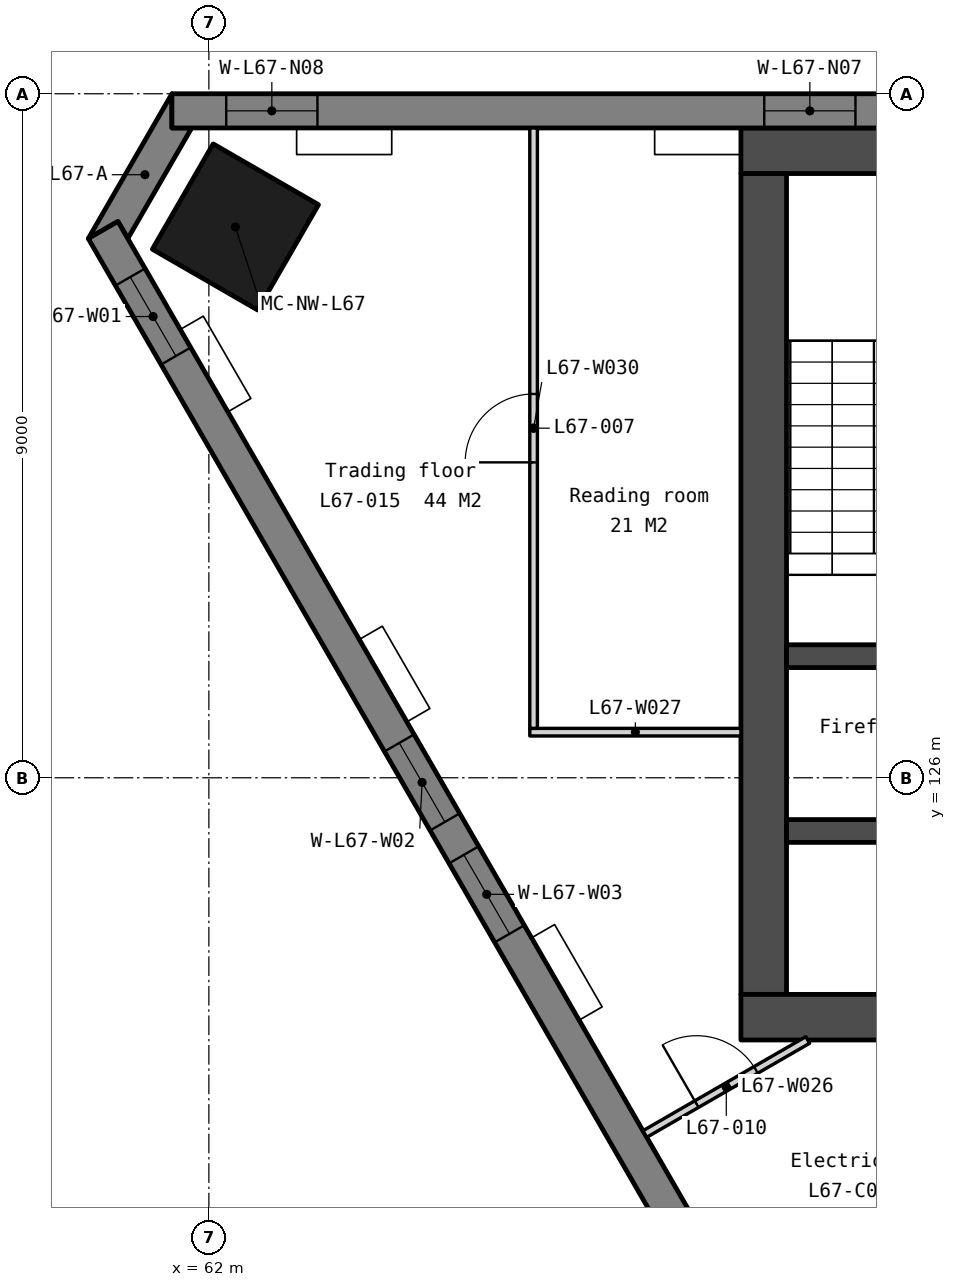
"""IFC4 building model, lengths in metres.
Left out: names, types, materials, properties, quantities, classifications, styles, units other than length and angle.
Written with IfcOpenShell. Run it as: python <this file> out.ifc"""

import sys

from ifc_helpers import new_model, si_unit, direction, frame, frame_2d, origin, origin_2d, place, context, subcontext, project, spatial, polyline, rectangle, outline, extrude, element, fill, save


model = new_model("IFC4")
c1 = context("Model", 3, precision=1e-05, world=origin(), true_north=direction((0.0, 1.0)))
c2 = subcontext(c1, "Body", "Model", "MODEL_VIEW")
j1 = project(units=[si_unit("LENGTHUNIT", "METRE"), si_unit("PLANEANGLEUNIT", "RADIAN")], contexts=[c1])
p1 = place(None, origin())
s1 = spatial("IfcSite", under=j1, at=p1, CompositionType="ELEMENT")
p2 = place(p1, origin())
s2 = spatial("IfcBuilding", under=s1, at=p2, CompositionType="ELEMENT")
p3 = place(p2, frame((0.0, 0.0, 273.8)))
s3 = spatial("IfcBuildingStorey", under=s2, at=p3, CompositionType="ELEMENT", Elevation=273.8)
p4 = place(p3, frame((62.349, 133.247, 0.0), z_axis=(0.0, 0.0, 1.0), x_axis=(-0.5, -0.866025403784, 0.0)))
e1 = element("IfcColumn", 1, at=p4, inside=s3, PredefinedType="COLUMN", context=c2, shape_type="SweptSolid", body=[
    extrude(rectangle(XDim=1.6, YDim=1.6, at=origin_2d()), origin(), (0.0, 0.0, 1.0), 3.9),
])
p5 = place(p3, frame((69.0, 134.25, 0.0), z_axis=(0.0, 0.0, 1.0), x_axis=(1.0, 0.0, 0.0)))
e2 = element("IfcWall", 2, at=p5, inside=s3, PredefinedType="SOLIDWALL", context=c2, shape_type="SweptSolid", body=[
    extrude(rectangle(XDim=22.0, YDim=0.6, at=frame_2d((11.0, 0.0))), origin(), (0.0, 0.0, 1.0), 3.75),
])
p6 = place(p3, frame((69.3, 133.95, 0.0), z_axis=(0.0, 0.0, 1.0), x_axis=(0.0, -1.0, 0.0)))
e3 = element("IfcWall", 3, at=p6, inside=s3, PredefinedType="SOLIDWALL", context=c2, shape_type="SweptSolid", body=[
    extrude(rectangle(XDim=10.8, YDim=0.6, at=frame_2d((5.4, 0.0))), origin(), (0.0, 0.0, 1.0), 3.75),
])
p7 = place(p3, frame((69.0, 122.85, 0.0), z_axis=(0.0, 0.0, 1.0), x_axis=(1.0, 0.0, 0.0)))
e4 = element("IfcWall", 4, at=p7, inside=s3, PredefinedType="SOLIDWALL", context=c2, shape_type="SweptSolid", body=[
    extrude(rectangle(XDim=22.0, YDim=0.6, at=frame_2d((11.0, 0.0))), origin(), (0.0, 0.0, 1.0), 3.75),
])
p8 = place(p7, frame((16.375, 0.0, 0.0)))
e5 = element("IfcOpeningElement", 5, at=p8, cuts=e4, PredefinedType="OPENING", context=c2, shape_type="SweptSolid", body=[
    extrude(rectangle(XDim=1.8, YDim=2.1, at=frame_2d((0.9, 1.05))), frame((0.0, 0.31, 0.0), z_axis=(0.0, -1.0, 0.0), x_axis=(1.0, 0.0, 0.0)), (0.0, 0.0, 1.0), 0.62),
])
p9 = place(p7, frame((3.825, 0.0, 0.0)))
e6 = element("IfcOpeningElement", 6, at=p9, cuts=e4, PredefinedType="OPENING", context=c2, shape_type="SweptSolid", body=[
    extrude(rectangle(XDim=1.8, YDim=2.1, at=frame_2d((0.9, 1.05))), frame((0.0, 0.31, 0.0), z_axis=(0.0, -1.0, 0.0), x_axis=(1.0, 0.0, 0.0)), (0.0, 0.0, 1.0), 0.62),
])
p10 = place(p7, frame((12.85, 0.0, 0.0)))
e7 = element("IfcOpeningElement", 7, at=p10, cuts=e4, PredefinedType="OPENING", context=c2, shape_type="SweptSolid", body=[
    extrude(rectangle(XDim=1.5, YDim=2.1, at=frame_2d((0.75, 1.05))), frame((0.0, 0.31, 0.0), z_axis=(0.0, -1.0, 0.0), x_axis=(1.0, 0.0, 0.0)), (0.0, 0.0, 1.0), 0.62),
])
for number, where, z_axis, x_axis in (
    (8, (69.6, 127.6, 0.0), (0.0, 0.0, 1.0), (1.0, 0.0, 0.0)),
    (9, (69.6, 125.3, 0.0), (0.0, 0.0, 1.0), (1.0, 0.0, 0.0)),
):
    element("IfcWall", number, at=place(p3, frame(where, z_axis=z_axis, x_axis=x_axis)), inside=s3, PredefinedType="SOLIDWALL", context=c2, shape_type="SweptSolid", body=[
        extrude(rectangle(XDim=2.55, YDim=0.3, at=frame_2d((1.275, 0.0))), origin(), (0.0, 0.0, 1.0), 3.75),
    ])
p11 = place(p3, frame((0.0, 0.0, -0.15)))
e10 = element("IfcWall", 10, at=p11, inside=s3, PredefinedType="SOLIDWALL", context=c2, shape_type="SweptSolid", body=[
    extrude(outline(polyline([(61.514, 135.0), (61.514, 134.55), (61.774, 134.55), (60.933, 133.095), (60.803, 133.32), (60.414, 133.095), (61.514, 135.0)])), origin(), (0.0, 0.0, 1.0), 3.9),
])
p12 = place(p3, frame((98.486, 134.775, -0.15), z_axis=(0.0, 0.0, 1.0), x_axis=(-1.0, 0.0, 0.0)))
e11 = element("IfcWall", 11, at=p12, inside=s3, PredefinedType="SOLIDWALL", context=c2, shape_type="SweptSolid", body=[
    extrude(outline(polyline([(36.972, 0.0), (36.972, 3.9), (0.0, 3.9), (0.0, 0.0), (36.972, 0.0)])), frame((0.0, 0.225, 0.0), z_axis=(0.0, -1.0, 0.0), x_axis=(1.0, 0.0, 0.0)), (0.0, 0.0, 1.0), 0.45),
])
p13 = place(p12, frame((0.715, 0.0, 0.95)))
e12 = element("IfcOpeningElement", 12, at=p13, cuts=e11, PredefinedType="OPENING", context=c2, shape_type="SweptSolid", body=[
    extrude(rectangle(XDim=1.2, YDim=2.2, at=frame_2d((0.6, 1.1))), frame((0.0, 0.235, 0.0), z_axis=(0.0, -1.0, 0.0), x_axis=(1.0, 0.0, 0.0)), (0.0, 0.0, 1.0), 0.47),
])
p14 = place(p12, frame((7.793, 0.0, 0.95)))
e13 = element("IfcOpeningElement", 13, at=p14, cuts=e11, PredefinedType="OPENING", context=c2, shape_type="SweptSolid", body=[
    extrude(rectangle(XDim=1.2, YDim=2.2, at=frame_2d((0.6, 1.1))), frame((0.0, 0.235, 0.0), z_axis=(0.0, -1.0, 0.0), x_axis=(1.0, 0.0, 0.0)), (0.0, 0.0, 1.0), 0.47),
])
p15 = place(p12, frame((9.493, 0.0, 0.95)))
e14 = element("IfcOpeningElement", 14, at=p15, cuts=e11, PredefinedType="OPENING", context=c2, shape_type="SweptSolid", body=[
    extrude(rectangle(XDim=1.2, YDim=2.2, at=frame_2d((0.6, 1.1))), frame((0.0, 0.235, 0.0), z_axis=(0.0, -1.0, 0.0), x_axis=(1.0, 0.0, 0.0)), (0.0, 0.0, 1.0), 0.47),
])
p16 = place(p12, frame((17.036, 0.0, 0.95)))
e15 = element("IfcOpeningElement", 15, at=p16, cuts=e11, PredefinedType="OPENING", context=c2, shape_type="SweptSolid", body=[
    extrude(rectangle(XDim=1.2, YDim=2.2, at=frame_2d((0.6, 1.1))), frame((0.0, 0.235, 0.0), z_axis=(0.0, -1.0, 0.0), x_axis=(1.0, 0.0, 0.0)), (0.0, 0.0, 1.0), 0.47),
])
p17 = place(p12, frame((18.736, 0.0, 0.95)))
e16 = element("IfcOpeningElement", 16, at=p17, cuts=e11, PredefinedType="OPENING", context=c2, shape_type="SweptSolid", body=[
    extrude(rectangle(XDim=1.2, YDim=2.2, at=frame_2d((0.6, 1.1))), frame((0.0, 0.235, 0.0), z_axis=(0.0, -1.0, 0.0), x_axis=(1.0, 0.0, 0.0)), (0.0, 0.0, 1.0), 0.47),
])
p18 = place(p12, frame((26.279, 0.0, 0.95)))
e17 = element("IfcOpeningElement", 17, at=p18, cuts=e11, PredefinedType="OPENING", context=c2, shape_type="SweptSolid", body=[
    extrude(rectangle(XDim=1.2, YDim=2.2, at=frame_2d((0.6, 1.1))), frame((0.0, 0.235, 0.0), z_axis=(0.0, -1.0, 0.0), x_axis=(1.0, 0.0, 0.0)), (0.0, 0.0, 1.0), 0.47),
])
p19 = place(p12, frame((27.979, 0.0, 0.95)))
e18 = element("IfcOpeningElement", 18, at=p19, cuts=e11, PredefinedType="OPENING", context=c2, shape_type="SweptSolid", body=[
    extrude(rectangle(XDim=1.2, YDim=2.2, at=frame_2d((0.6, 1.1))), frame((0.0, 0.235, 0.0), z_axis=(0.0, -1.0, 0.0), x_axis=(1.0, 0.0, 0.0)), (0.0, 0.0, 1.0), 0.47),
])
p20 = place(p12, frame((35.058, 0.0, 0.95)))
e19 = element("IfcOpeningElement", 19, at=p20, cuts=e11, PredefinedType="OPENING", context=c2, shape_type="SweptSolid", body=[
    extrude(rectangle(XDim=1.2, YDim=2.2, at=frame_2d((0.6, 1.1))), frame((0.0, 0.235, 0.0), z_axis=(0.0, -1.0, 0.0), x_axis=(1.0, 0.0, 0.0)), (0.0, 0.0, 1.0), 0.47),
])
p21 = place(p3, frame((60.609, 133.207, -0.15), z_axis=(0.0, 0.0, 1.0), x_axis=(0.500002536638, -0.866023939251, 0.0)))
e20 = element("IfcWall", 20, at=p21, inside=s3, PredefinedType="SOLIDWALL", context=c2, shape_type="SweptSolid", body=[
    extrude(outline(polyline([(36.972, 0.0), (36.972, 3.9), (0.0, 3.9), (0.0, 0.0), (36.972, 0.0)])), frame((0.0, 0.225, 0.0), z_axis=(0.0, -1.0, 0.0), x_axis=(1.0, 0.0, 0.0)), (0.0, 0.0, 1.0), 0.45),
])
p22 = place(p21, frame((0.715, 0.0, 0.95)))
e21 = element("IfcOpeningElement", 21, at=p22, cuts=e20, PredefinedType="OPENING", context=c2, shape_type="SweptSolid", body=[
    extrude(rectangle(XDim=1.2, YDim=2.2, at=frame_2d((0.6, 1.1))), frame((0.0, 0.235, 0.0), z_axis=(0.0, -1.0, 0.0), x_axis=(1.0, 0.0, 0.0)), (0.0, 0.0, 1.0), 0.47),
])
p23 = place(p21, frame((7.793, 0.0, 0.95)))
e22 = element("IfcOpeningElement", 22, at=p23, cuts=e20, PredefinedType="OPENING", context=c2, shape_type="SweptSolid", body=[
    extrude(rectangle(XDim=1.2, YDim=2.2, at=frame_2d((0.6, 1.1))), frame((0.0, 0.235, 0.0), z_axis=(0.0, -1.0, 0.0), x_axis=(1.0, 0.0, 0.0)), (0.0, 0.0, 1.0), 0.47),
])
p24 = place(p21, frame((9.493, 0.0, 0.95)))
e23 = element("IfcOpeningElement", 23, at=p24, cuts=e20, PredefinedType="OPENING", context=c2, shape_type="SweptSolid", body=[
    extrude(rectangle(XDim=1.2, YDim=2.2, at=frame_2d((0.6, 1.1))), frame((0.0, 0.235, 0.0), z_axis=(0.0, -1.0, 0.0), x_axis=(1.0, 0.0, 0.0)), (0.0, 0.0, 1.0), 0.47),
])
p25 = place(p21, frame((17.036, 0.0, 0.95)))
e24 = element("IfcOpeningElement", 24, at=p25, cuts=e20, PredefinedType="OPENING", context=c2, shape_type="SweptSolid", body=[
    extrude(rectangle(XDim=1.2, YDim=2.2, at=frame_2d((0.6, 1.1))), frame((0.0, 0.235, 0.0), z_axis=(0.0, -1.0, 0.0), x_axis=(1.0, 0.0, 0.0)), (0.0, 0.0, 1.0), 0.47),
])
p26 = place(p21, frame((18.736, 0.0, 0.95)))
e25 = element("IfcOpeningElement", 25, at=p26, cuts=e20, PredefinedType="OPENING", context=c2, shape_type="SweptSolid", body=[
    extrude(rectangle(XDim=1.2, YDim=2.2, at=frame_2d((0.6, 1.1))), frame((0.0, 0.235, 0.0), z_axis=(0.0, -1.0, 0.0), x_axis=(1.0, 0.0, 0.0)), (0.0, 0.0, 1.0), 0.47),
])
p27 = place(p21, frame((26.279, 0.0, 0.95)))
e26 = element("IfcOpeningElement", 26, at=p27, cuts=e20, PredefinedType="OPENING", context=c2, shape_type="SweptSolid", body=[
    extrude(rectangle(XDim=1.2, YDim=2.2, at=frame_2d((0.6, 1.1))), frame((0.0, 0.235, 0.0), z_axis=(0.0, -1.0, 0.0), x_axis=(1.0, 0.0, 0.0)), (0.0, 0.0, 1.0), 0.47),
])
p28 = place(p21, frame((27.979, 0.0, 0.95)))
e27 = element("IfcOpeningElement", 27, at=p28, cuts=e20, PredefinedType="OPENING", context=c2, shape_type="SweptSolid", body=[
    extrude(rectangle(XDim=1.2, YDim=2.2, at=frame_2d((0.6, 1.1))), frame((0.0, 0.235, 0.0), z_axis=(0.0, -1.0, 0.0), x_axis=(1.0, 0.0, 0.0)), (0.0, 0.0, 1.0), 0.47),
])
p29 = place(p21, frame((35.058, 0.0, 0.95)))
e28 = element("IfcOpeningElement", 28, at=p29, cuts=e20, PredefinedType="OPENING", context=c2, shape_type="SweptSolid", body=[
    extrude(rectangle(XDim=1.2, YDim=2.2, at=frame_2d((0.6, 1.1))), frame((0.0, 0.235, 0.0), z_axis=(0.0, -1.0, 0.0), x_axis=(1.0, 0.0, 0.0)), (0.0, 0.0, 1.0), 0.47),
])
p30 = place(p3, frame((67.736, 121.313, 0.0), z_axis=(0.0, 0.0, 1.0), x_axis=(0.86604923931, 0.499958713387, 0.0)))
e29 = element("IfcWall", 29, at=p30, inside=s3, PredefinedType="PARTITIONING", context=c2, shape_type="SweptSolid", body=[
    extrude(rectangle(XDim=2.475, YDim=0.1, at=frame_2d((1.237, 0.0))), origin(), (0.0, 0.0, 1.0), 3.75),
])
p31 = place(p30, frame((0.787, 0.0, 0.0)))
e30 = element("IfcOpeningElement", 30, at=p31, cuts=e29, PredefinedType="OPENING", context=c2, shape_type="SweptSolid", body=[
    extrude(rectangle(XDim=0.9, YDim=2.1, at=frame_2d((0.45, 1.05))), frame((0.0, 0.06, 0.0), z_axis=(0.0, -1.0, 0.0), x_axis=(1.0, 0.0, 0.0)), (0.0, 0.0, 1.0), 0.12),
])
p32 = place(p3, frame((66.222, 126.6, 0.0), z_axis=(0.0, 0.0, 1.0), x_axis=(1.0, 0.0, 0.0)))
e31 = element("IfcWall", 31, at=p32, inside=s3, PredefinedType="PARTITIONING", context=c2, shape_type="SweptSolid", body=[
    extrude(rectangle(XDim=2.778, YDim=0.1, at=frame_2d((1.389, 0.0))), origin(), (0.0, 0.0, 1.0), 3.75),
])
p33 = place(p3, frame((66.272, 126.65, 0.0), z_axis=(0.0, 0.0, 1.0), x_axis=(0.0, 1.0, 0.0)))
e32 = element("IfcWall", 32, at=p33, inside=s3, PredefinedType="PARTITIONING", context=c2, shape_type="SweptSolid", body=[
    extrude(rectangle(XDim=7.9, YDim=0.1, at=frame_2d((3.95, 0.0))), origin(), (0.0, 0.0, 1.0), 3.75),
])
p34 = place(p33, frame((3.5, 0.0, 0.0)))
e33 = element("IfcOpeningElement", 33, at=p34, cuts=e32, PredefinedType="OPENING", context=c2, shape_type="SweptSolid", body=[
    extrude(rectangle(XDim=0.9, YDim=2.1, at=frame_2d((0.45, 1.05))), frame((0.0, 0.06, 0.0), z_axis=(0.0, -1.0, 0.0), x_axis=(1.0, 0.0, 0.0)), (0.0, 0.0, 1.0), 0.12),
])
p35 = place(p19, origin())
e34 = element("IfcWindow", 34, at=p35, inside=s3, PartitioningType="SINGLE_PANEL", PredefinedType="WINDOW", context=c2, shape_type="SweptSolid", body=[
    extrude(rectangle(XDim=1.2, YDim=2.2, at=frame_2d((0.6, 1.1))), frame((0.0, 0.03, 0.0), z_axis=(0.0, -1.0, 0.0), x_axis=(1.0, 0.0, 0.0)), (0.0, 0.0, 1.0), 0.06),
])
fill(e18, e34)
p36 = place(p20, origin())
e35 = element("IfcWindow", 35, at=p36, inside=s3, PartitioningType="SINGLE_PANEL", PredefinedType="WINDOW", context=c2, shape_type="SweptSolid", body=[
    extrude(rectangle(XDim=1.2, YDim=2.2, at=frame_2d((0.6, 1.1))), frame((0.0, 0.03, 0.0), z_axis=(0.0, -1.0, 0.0), x_axis=(1.0, 0.0, 0.0)), (0.0, 0.0, 1.0), 0.06),
])
fill(e19, e35)
p37 = place(p22, origin())
e36 = element("IfcWindow", 36, at=p37, inside=s3, PartitioningType="SINGLE_PANEL", PredefinedType="WINDOW", context=c2, shape_type="SweptSolid", body=[
    extrude(rectangle(XDim=1.2, YDim=2.2, at=frame_2d((0.6, 1.1))), frame((0.0, 0.03, 0.0), z_axis=(0.0, -1.0, 0.0), x_axis=(1.0, 0.0, 0.0)), (0.0, 0.0, 1.0), 0.06),
])
fill(e21, e36)
p38 = place(p23, origin())
e37 = element("IfcWindow", 37, at=p38, inside=s3, PartitioningType="SINGLE_PANEL", PredefinedType="WINDOW", context=c2, shape_type="SweptSolid", body=[
    extrude(rectangle(XDim=1.2, YDim=2.2, at=frame_2d((0.6, 1.1))), frame((0.0, 0.03, 0.0), z_axis=(0.0, -1.0, 0.0), x_axis=(1.0, 0.0, 0.0)), (0.0, 0.0, 1.0), 0.06),
])
fill(e22, e37)
p39 = place(p24, origin())
e38 = element("IfcWindow", 38, at=p39, inside=s3, PartitioningType="SINGLE_PANEL", PredefinedType="WINDOW", context=c2, shape_type="SweptSolid", body=[
    extrude(rectangle(XDim=1.2, YDim=2.2, at=frame_2d((0.6, 1.1))), frame((0.0, 0.03, 0.0), z_axis=(0.0, -1.0, 0.0), x_axis=(1.0, 0.0, 0.0)), (0.0, 0.0, 1.0), 0.06),
])
fill(e23, e38)
p40 = place(p34, origin())
e39 = element("IfcDoor", 39, at=p40, inside=s3, OperationType="SINGLE_SWING_LEFT", PredefinedType="DOOR", context=c2, shape_type="SweptSolid", body=[
    extrude(rectangle(XDim=0.9, YDim=2.1, at=frame_2d((0.45, 1.05))), frame((0.0, 0.025, 0.0), z_axis=(0.0, -1.0, 0.0), x_axis=(1.0, 0.0, 0.0)), (0.0, 0.0, 1.0), 0.05),
])
fill(e33, e39)
p41 = place(p31, origin())
e40 = element("IfcDoor", 40, at=p41, inside=s3, OperationType="SINGLE_SWING_LEFT", PredefinedType="DOOR", context=c2, shape_type="SweptSolid", body=[
    extrude(rectangle(XDim=0.9, YDim=2.1, at=frame_2d((0.45, 1.05))), frame((0.0, 0.025, 0.0), z_axis=(0.0, -1.0, 0.0), x_axis=(1.0, 0.0, 0.0)), (0.0, 0.0, 1.0), 0.05),
])
fill(e30, e40)
save(model, sys.argv[1])
